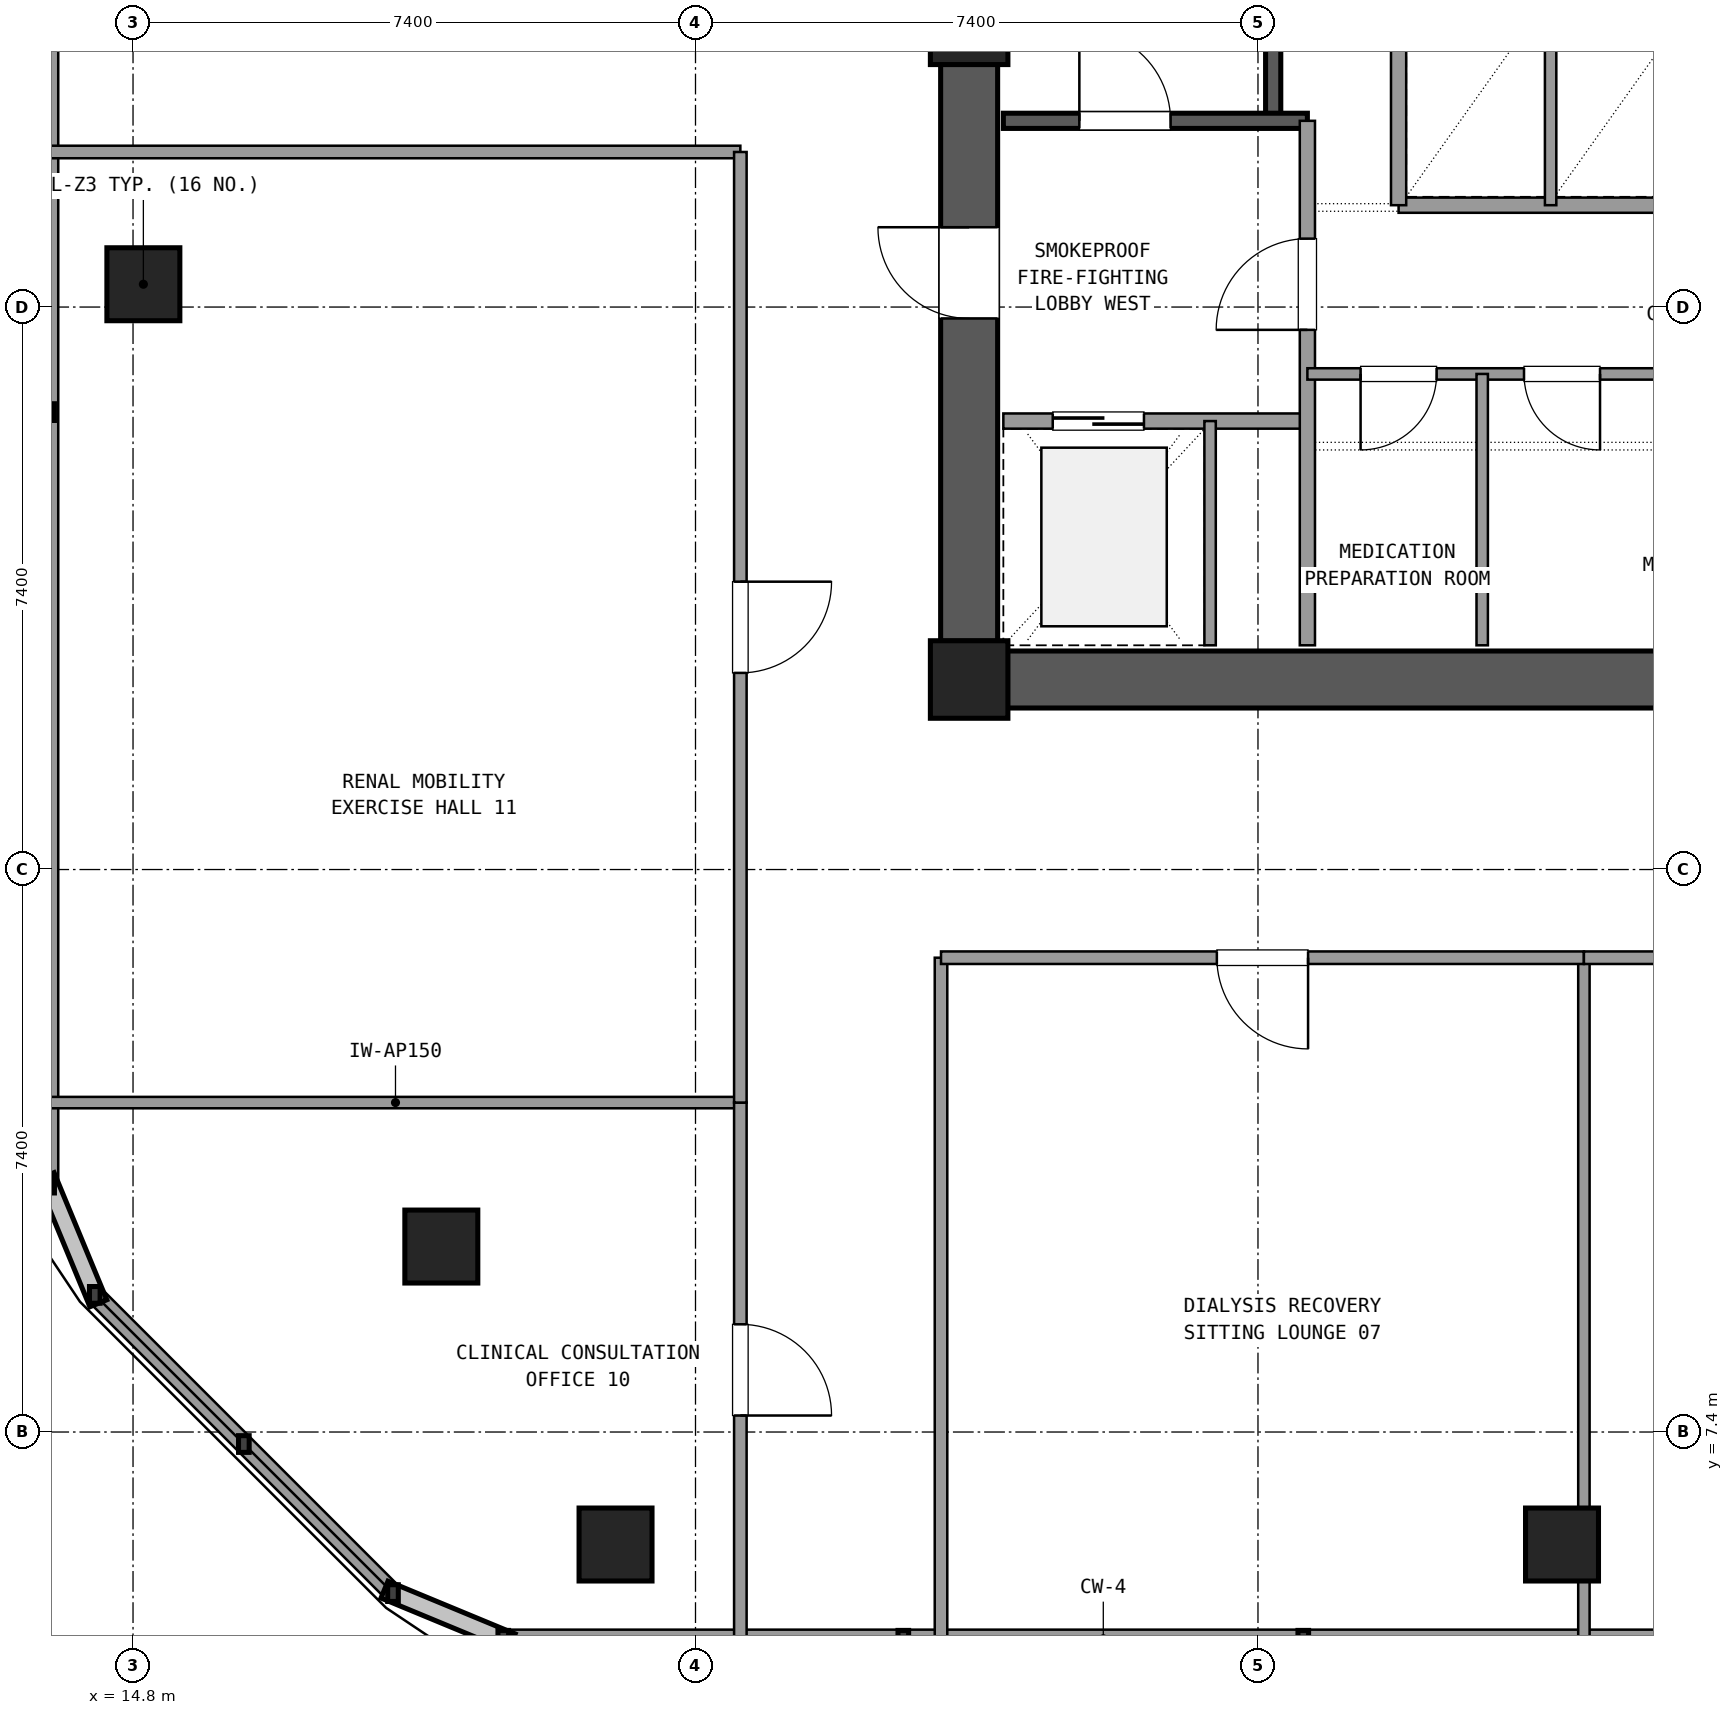
"""IFC4 building model, lengths in metres.
Left out: names, types, materials, properties, quantities, classifications, styles, units other than length and angle.
Written with IfcOpenShell. Run it as: python <this file> out.ifc"""

import sys

from ifc_helpers import new_model, si_unit, direction, frame, frame_2d, origin, origin_2d, place, context, subcontext, project, spatial, rectangle, extrude, element, fill, save


model = new_model("IFC4")
c1 = context("Model", 3, precision=1e-05, world=origin(), true_north=direction((0.0, 1.0)))
c2 = subcontext(c1, "Body", "Model", "MODEL_VIEW")
j1 = project(units=[si_unit("LENGTHUNIT", "METRE"), si_unit("PLANEANGLEUNIT", "RADIAN")], contexts=[c1])
p1 = place(None, origin())
s1 = spatial("IfcSite", under=j1, at=p1, CompositionType="ELEMENT")
p2 = place(p1, origin())
s2 = spatial("IfcBuilding", under=s1, at=p2, CompositionType="ELEMENT")
p3 = place(p2, frame((0.0, 0.0, 152.82)))
s3 = spatial("IfcBuildingStorey", under=s2, at=p3, CompositionType="ELEMENT", Elevation=152.82)
for number, where, z_axis, x_axis in (
    (1, (25.8, 17.3, 0.0), (0.0, 0.0, 1.0), (1.0, 0.0, 0.0)),
    (2, (25.8, 25.9, 0.0), (0.0, 0.0, 1.0), (1.0, 0.0, 0.0)),
):
    element("IfcColumn", number, at=place(p3, frame(where, z_axis=z_axis, x_axis=x_axis)), inside=s3, PredefinedType="COLUMN", context=c2, shape_type="SweptSolid", body=[
        extrude(rectangle(XDim=1.02, YDim=1.02, at=origin_2d()), origin(), (0.0, 0.0, 1.0), 3.6),
    ])
p4 = place(p3, frame((26.305, 17.3, 0.0), z_axis=(0.0, 0.0, 1.0), x_axis=(1.0, 0.0, 0.0)))
e3 = element("IfcWall", 3, at=p4, inside=s3, PredefinedType="SHEAR", context=c2, shape_type="SweptSolid", body=[
    extrude(rectangle(XDim=10.19, YDim=0.75, at=frame_2d((5.095, 0.0))), origin(), (0.0, 0.0, 1.0), 3.32),
])
p5 = place(p3, frame((25.8, 25.395, 0.0), z_axis=(0.0, 0.0, 1.0), x_axis=(0.0, -1.0, 0.0)))
e4 = element("IfcWall", 4, at=p5, inside=s3, PredefinedType="SHEAR", context=c2, shape_type="SweptSolid", body=[
    extrude(rectangle(XDim=7.59, YDim=0.75, at=frame_2d((3.795, 0.0))), origin(), (0.0, 0.0, 1.0), 3.32),
])
p6 = place(p5, frame((2.145, 0.0, 0.0)))
e5 = element("IfcOpeningElement", 5, at=p6, cuts=e4, PredefinedType="OPENING", context=c2, shape_type="SweptSolid", body=[
    extrude(rectangle(XDim=1.2, YDim=2.15, at=frame_2d((0.6, 1.075))), frame((0.0, 0.385, 0.0), z_axis=(0.0, -1.0, 0.0), x_axis=(1.0, 0.0, 0.0)), (0.0, 0.0, 1.0), 0.77),
])
for number, where, z_axis, x_axis in (
    (6, (14.936, 22.5, 0.0), (0.0, 0.0, 1.0), (1.0, 0.0, 0.0)),
    (7, (18.856, 9.84, 0.0), (0.0, 0.0, 1.0), (1.0, 0.0, 0.0)),
    (8, (21.148, 5.92, 0.0), (0.0, 0.0, 1.0), (1.0, 0.0, 0.0)),
    (9, (33.6, 5.92, 0.0), (0.0, 0.0, 1.0), (1.0, 0.0, 0.0)),
):
    element("IfcColumn", number, at=place(p3, frame(where, z_axis=z_axis, x_axis=x_axis)), inside=s3, PredefinedType="COLUMN", context=c2, shape_type="SweptSolid", body=[
        extrude(rectangle(XDim=0.96, YDim=0.96, at=origin_2d()), origin(), (0.0, 0.0, 1.0), 3.6),
    ])
p7 = place(p3, frame((19.671, 4.68, 0.0), z_axis=(0.0, 0.0, 1.0), x_axis=(1.0, 0.0, 0.0)))
e10 = element("IfcWall", 10, at=p7, inside=s3, PredefinedType="SOLIDWALL", context=c2, shape_type="SweptSolid", body=[
    extrude(rectangle(XDim=15.788, YDim=0.24, at=frame_2d((7.894, 0.0))), origin(), (0.0, 0.0, 1.0), 0.85),
])
p8 = place(p3, frame((13.696, 41.145, 0.0), z_axis=(0.0, 0.0, 1.0), x_axis=(0.0, -1.0, 0.0)))
e11 = element("IfcWall", 11, at=p8, inside=s3, PredefinedType="SOLIDWALL", context=c2, shape_type="SweptSolid", body=[
    extrude(rectangle(XDim=30.49, YDim=0.24, at=frame_2d((15.245, 0.0))), origin(), (0.0, 0.0, 1.0), 0.85),
])
p9 = place(p3, frame((14.297, 9.204, 0.0), z_axis=(0.0, 0.0, 1.0), x_axis=(0.707084777957, -0.707128783731, 0.0)))
e12 = element("IfcWall", 12, at=p9, inside=s3, PredefinedType="SOLIDWALL", context=c2, shape_type="SweptSolid", body=[
    extrude(rectangle(XDim=5.548, YDim=0.24, at=frame_2d((2.774, 0.0))), origin(), (0.0, 0.0, 1.0), 0.85),
])
p10 = place(p3, frame((29.8, 24.65, 0.0), z_axis=(0.0, 0.0, 1.0), x_axis=(0.0, 1.0, 0.0)))
e13 = element("IfcWall", 13, at=p10, inside=s3, PredefinedType="SHEAR", context=c2, shape_type="SweptSolid", body=[
    extrude(rectangle(XDim=9.4, YDim=0.2, at=frame_2d((4.7, 0.0))), origin(), (0.0, 0.0, 1.0), 3.32),
])
p11 = place(p3, frame((26.25, 24.65, 0.0), z_axis=(0.0, 0.0, 1.0), x_axis=(1.0, 0.0, 0.0)))
e14 = element("IfcWall", 14, at=p11, inside=s3, PredefinedType="SHEAR", context=c2, shape_type="SweptSolid", body=[
    extrude(rectangle(XDim=4.0, YDim=0.2, at=frame_2d((2.0, 0.0))), origin(), (0.0, 0.0, 1.0), 3.32),
])
p12 = place(p11, frame((1.0, 0.0, 0.0)))
e15 = element("IfcOpeningElement", 15, at=p12, cuts=e14, PredefinedType="OPENING", context=c2, shape_type="SweptSolid", body=[
    extrude(rectangle(XDim=1.2, YDim=2.15, at=frame_2d((0.6, 1.075))), frame((0.0, 0.11, 0.0), z_axis=(0.0, -1.0, 0.0), x_axis=(1.0, 0.0, 0.0)), (0.0, 0.0, 1.0), 0.22),
])
p13 = place(p3, frame((26.25, 20.7, 0.0), z_axis=(0.0, 0.0, 1.0), x_axis=(1.0, 0.0, 0.0)))
e16 = element("IfcWall", 16, at=p13, inside=s3, PredefinedType="SOLIDWALL", context=c2, shape_type="SweptSolid", body=[
    extrude(rectangle(XDim=4.0, YDim=0.2, at=frame_2d((2.0, 0.0))), origin(), (0.0, 0.0, 1.0), 2.61),
])
p14 = place(p13, frame((0.65, 0.0, 0.0)))
e17 = element("IfcOpeningElement", 17, at=p14, cuts=e16, PredefinedType="OPENING", context=c2, shape_type="SweptSolid", body=[
    extrude(rectangle(XDim=1.2, YDim=2.15, at=frame_2d((0.6, 1.075))), frame((0.0, 0.11, 0.0), z_axis=(0.0, -1.0, 0.0), x_axis=(1.0, 0.0, 0.0)), (0.0, 0.0, 1.0), 0.22),
])
p15 = place(p3, frame((30.25, 17.75, 0.0), z_axis=(0.0, 0.0, 1.0), x_axis=(0.0, 1.0, 0.0)))
e18 = element("IfcWall", 18, at=p15, inside=s3, PredefinedType="SOLIDWALL", context=c2, shape_type="SweptSolid", body=[
    extrude(rectangle(XDim=6.9, YDim=0.2, at=frame_2d((3.45, 0.0))), origin(), (0.0, 0.0, 1.0), 2.61),
])
p16 = place(p15, frame((4.15, 0.0, 0.0)))
e19 = element("IfcOpeningElement", 19, at=p16, cuts=e18, PredefinedType="OPENING", context=c2, shape_type="SweptSolid", body=[
    extrude(rectangle(XDim=1.2, YDim=2.15, at=frame_2d((0.6, 1.075))), frame((0.0, 0.11, 0.0), z_axis=(0.0, -1.0, 0.0), x_axis=(1.0, 0.0, 0.0)), (0.0, 0.0, 1.0), 0.22),
])
p17 = place(p3, frame((28.97, 17.75, 0.0), z_axis=(0.0, 0.0, 1.0), x_axis=(0.0, 1.0, 0.0)))
e20 = element("IfcWall", 20, at=p17, inside=s3, PredefinedType="PARTITIONING", context=c2, shape_type="SweptSolid", body=[
    extrude(rectangle(XDim=2.95, YDim=0.15, at=frame_2d((1.475, 0.0))), origin(), (0.0, 0.0, 1.0), 2.61),
])
p18 = place(p3, frame((30.25, 21.32, 0.0), z_axis=(0.0, 0.0, 1.0), x_axis=(1.0, 0.0, 0.0)))
e21 = element("IfcWall", 21, at=p18, inside=s3, PredefinedType="PARTITIONING", context=c2, shape_type="SweptSolid", body=[
    extrude(rectangle(XDim=7.0, YDim=0.15, at=frame_2d((3.5, 0.0))), origin(), (0.0, 0.0, 1.0), 2.61),
])
p19 = place(p18, frame((0.7, 0.0, 0.0)))
e22 = element("IfcOpeningElement", 22, at=p19, cuts=e21, PredefinedType="OPENING", context=c2, shape_type="SweptSolid", body=[
    extrude(rectangle(XDim=1.0, YDim=2.15, at=frame_2d((0.5, 1.075))), frame((0.0, 0.085, 0.0), z_axis=(0.0, -1.0, 0.0), x_axis=(1.0, 0.0, 0.0)), (0.0, 0.0, 1.0), 0.17),
])
p20 = place(p18, frame((2.85, 0.0, 0.0)))
e23 = element("IfcOpeningElement", 23, at=p20, cuts=e21, PredefinedType="OPENING", context=c2, shape_type="SweptSolid", body=[
    extrude(rectangle(XDim=1.0, YDim=2.15, at=frame_2d((0.5, 1.075))), frame((0.0, 0.085, 0.0), z_axis=(0.0, -1.0, 0.0), x_axis=(1.0, 0.0, 0.0)), (0.0, 0.0, 1.0), 0.17),
])
p21 = place(p3, frame((32.55, 17.75, 0.0), z_axis=(0.0, 0.0, 1.0), x_axis=(0.0, 1.0, 0.0)))
e24 = element("IfcWall", 24, at=p21, inside=s3, PredefinedType="PARTITIONING", context=c2, shape_type="SweptSolid", body=[
    extrude(rectangle(XDim=3.57, YDim=0.15, at=frame_2d((1.785, 0.0))), origin(), (0.0, 0.0, 1.0), 2.61),
])
p22 = place(p3, frame((31.45, 23.54, 0.0), z_axis=(0.0, 0.0, 1.0), x_axis=(1.0, 0.0, 0.0)))
e25 = element("IfcWall", 25, at=p22, inside=s3, PredefinedType="SOLIDWALL", context=c2, shape_type="SweptSolid", body=[
    extrude(rectangle(XDim=5.9, YDim=0.2, at=frame_2d((2.95, 0.0))), origin(), (0.0, 0.0, 1.0), 2.61),
])
p23 = place(p3, frame((31.45, 23.54, 0.0), z_axis=(0.0, 0.0, 1.0), x_axis=(0.0, 1.0, 0.0)))
e26 = element("IfcWall", 26, at=p23, inside=s3, PredefinedType="SOLIDWALL", context=c2, shape_type="SweptSolid", body=[
    extrude(rectangle(XDim=2.81, YDim=0.2, at=frame_2d((1.405, 0.0))), origin(), (0.0, 0.0, 1.0), 2.61),
])
p24 = place(p3, frame((33.45, 23.54, 0.0), z_axis=(0.0, 0.0, 1.0), x_axis=(0.0, 1.0, 0.0)))
e27 = element("IfcWall", 27, at=p24, inside=s3, PredefinedType="PARTITIONING", context=c2, shape_type="SweptSolid", body=[
    extrude(rectangle(XDim=2.81, YDim=0.15, at=frame_2d((1.405, 0.0))), origin(), (0.0, 0.0, 1.0), 2.61),
])
p25 = place(p3, frame((25.43, 4.7, 0.0), z_axis=(0.0, 0.0, 1.0), x_axis=(0.0, 1.0, 0.0)))
e28 = element("IfcWall", 28, at=p25, inside=s3, PredefinedType="PARTITIONING", context=c2, shape_type="SweptSolid", body=[
    extrude(rectangle(XDim=8.94, YDim=0.165, at=frame_2d((4.47, 0.0))), origin(), (0.0, 0.0, 1.0), 2.61),
])
p26 = place(p3, frame((13.716, 24.24, 0.0), z_axis=(0.0, 0.0, 1.0), x_axis=(1.0, 0.0, 0.0)))
e29 = element("IfcWall", 29, at=p26, inside=s3, PredefinedType="PARTITIONING", context=c2, shape_type="SweptSolid", body=[
    extrude(rectangle(XDim=9.074, YDim=0.165, at=frame_2d((4.537, 0.0))), origin(), (0.0, 0.0, 1.0), 2.61),
])
p27 = place(p3, frame((33.888, 13.64, 0.0), z_axis=(0.0, 0.0, 1.0), x_axis=(0.0, -1.0, 0.0)))
e30 = element("IfcWall", 30, at=p27, inside=s3, PredefinedType="PARTITIONING", context=c2, shape_type="SweptSolid", body=[
    extrude(rectangle(XDim=8.94, YDim=0.15, at=frame_2d((4.47, 0.0))), origin(), (0.0, 0.0, 1.0), 2.61),
])
p28 = place(p3, frame((25.43, 13.64, 0.0), z_axis=(0.0, 0.0, 1.0), x_axis=(1.0, 0.0, 0.0)))
e31 = element("IfcWall", 31, at=p28, inside=s3, PredefinedType="PARTITIONING", context=c2, shape_type="SweptSolid", body=[
    extrude(rectangle(XDim=8.458, YDim=0.165, at=frame_2d((4.229, 0.0))), origin(), (0.0, 0.0, 1.0), 2.61),
])
p29 = place(p28, frame((3.629, 0.0, 0.0)))
e32 = element("IfcOpeningElement", 32, at=p29, cuts=e31, PredefinedType="OPENING", context=c2, shape_type="SweptSolid", body=[
    extrude(rectangle(XDim=1.2, YDim=2.15, at=frame_2d((0.6, 1.075))), frame((0.0, 0.093, 0.0), z_axis=(0.0, -1.0, 0.0), x_axis=(1.0, 0.0, 0.0)), (0.0, 0.0, 1.0), 0.185),
])
p30 = place(p3, frame((33.888, 13.64, 0.0), z_axis=(0.0, 0.0, 1.0), x_axis=(1.0, 0.0, 0.0)))
e33 = element("IfcWall", 33, at=p30, inside=s3, PredefinedType="PARTITIONING", context=c2, shape_type="SweptSolid", body=[
    extrude(rectangle(XDim=6.118, YDim=0.165, at=frame_2d((3.059, 0.0))), origin(), (0.0, 0.0, 1.0), 2.61),
])
p31 = place(p30, frame((1.664, 0.0, 0.0)))
e34 = element("IfcOpeningElement", 34, at=p31, cuts=e33, PredefinedType="OPENING", context=c2, shape_type="SweptSolid", body=[
    extrude(rectangle(XDim=1.2, YDim=2.15, at=frame_2d((0.6, 1.075))), frame((0.0, 0.093, 0.0), z_axis=(0.0, -1.0, 0.0), x_axis=(1.0, 0.0, 0.0)), (0.0, 0.0, 1.0), 0.185),
])
p32 = place(p3, frame((22.79, 11.734, 0.0), z_axis=(0.0, 0.0, 1.0), x_axis=(-1.0, 0.0, 0.0)))
e35 = element("IfcWall", 35, at=p32, inside=s3, PredefinedType="PARTITIONING", context=c2, shape_type="SweptSolid", body=[
    extrude(rectangle(XDim=9.074, YDim=0.15, at=frame_2d((4.537, 0.0))), origin(), (0.0, 0.0, 1.0), 2.61),
])
p33 = place(p3, frame((22.79, 4.7, 0.0), z_axis=(0.0, 0.0, 1.0), x_axis=(0.0, 1.0, 0.0)))
e36 = element("IfcWall", 36, at=p33, inside=s3, PredefinedType="PARTITIONING", context=c2, shape_type="SweptSolid", body=[
    extrude(rectangle(XDim=7.034, YDim=0.165, at=frame_2d((3.517, 0.0))), origin(), (0.0, 0.0, 1.0), 2.61),
])
p34 = place(p33, frame((2.917, 0.0, 0.0)))
e37 = element("IfcOpeningElement", 37, at=p34, cuts=e36, PredefinedType="OPENING", context=c2, shape_type="SweptSolid", body=[
    extrude(rectangle(XDim=1.2, YDim=2.15, at=frame_2d((0.6, 1.075))), frame((0.0, 0.093, 0.0), z_axis=(0.0, -1.0, 0.0), x_axis=(1.0, 0.0, 0.0)), (0.0, 0.0, 1.0), 0.185),
])
p35 = place(p3, frame((22.79, 11.734, 0.0), z_axis=(0.0, 0.0, 1.0), x_axis=(0.0, 1.0, 0.0)))
e38 = element("IfcWall", 38, at=p35, inside=s3, PredefinedType="PARTITIONING", context=c2, shape_type="SweptSolid", body=[
    extrude(rectangle(XDim=12.506, YDim=0.165, at=frame_2d((6.253, 0.0))), origin(), (0.0, 0.0, 1.0), 2.61),
])
p36 = place(p35, frame((5.653, 0.0, 0.0)))
e39 = element("IfcOpeningElement", 39, at=p36, cuts=e38, PredefinedType="OPENING", context=c2, shape_type="SweptSolid", body=[
    extrude(rectangle(XDim=1.2, YDim=2.15, at=frame_2d((0.6, 1.075))), frame((0.0, 0.093, 0.0), z_axis=(0.0, -1.0, 0.0), x_axis=(1.0, 0.0, 0.0)), (0.0, 0.0, 1.0), 0.185),
])
p37 = place(p12, origin())
e40 = element("IfcDoor", 40, at=p37, inside=s3, OperationType="SINGLE_SWING_LEFT", PredefinedType="DOOR", context=c2, shape_type="SweptSolid", body=[
    extrude(rectangle(XDim=1.2, YDim=2.15, at=frame_2d((0.6, 1.075))), frame((0.0, 0.025, 0.0), z_axis=(0.0, -1.0, 0.0), x_axis=(1.0, 0.0, 0.0)), (0.0, 0.0, 1.0), 0.05),
])
fill(e15, e40)
p38 = place(p14, origin())
e41 = element("IfcDoor", 41, at=p38, inside=s3, OperationType="SLIDING_TO_LEFT", PredefinedType="DOOR", context=c2, shape_type="SweptSolid", body=[
    extrude(rectangle(XDim=1.2, YDim=2.15, at=frame_2d((0.6, 1.075))), frame((0.0, 0.025, 0.0), z_axis=(0.0, -1.0, 0.0), x_axis=(1.0, 0.0, 0.0)), (0.0, 0.0, 1.0), 0.05),
])
fill(e17, e41)
p39 = place(p16, origin())
e42 = element("IfcDoor", 42, at=p39, inside=s3, OperationType="SINGLE_SWING_LEFT", PredefinedType="DOOR", context=c2, shape_type="SweptSolid", body=[
    extrude(rectangle(XDim=1.2, YDim=2.15, at=frame_2d((0.6, 1.075))), frame((0.0, 0.025, 0.0), z_axis=(0.0, -1.0, 0.0), x_axis=(1.0, 0.0, 0.0)), (0.0, 0.0, 1.0), 0.05),
])
fill(e19, e42)
p40 = place(p6, frame((1.2, 0.0, 0.0), z_axis=(0.0, 0.0, 1.0), x_axis=(-1.0, 0.0, 0.0)))
e43 = element("IfcDoor", 43, at=p40, inside=s3, OperationType="SINGLE_SWING_LEFT", PredefinedType="DOOR", context=c2, shape_type="SweptSolid", body=[
    extrude(rectangle(XDim=1.2, YDim=2.15, at=frame_2d((0.6, 1.075))), frame((0.0, 0.025, 0.0), z_axis=(0.0, -1.0, 0.0), x_axis=(1.0, 0.0, 0.0)), (0.0, 0.0, 1.0), 0.05),
])
fill(e5, e43)
p41 = place(p19, frame((1.0, 0.0, 0.0), z_axis=(0.0, 0.0, 1.0), x_axis=(-1.0, 0.0, 0.0)))
e44 = element("IfcDoor", 44, at=p41, inside=s3, OperationType="SINGLE_SWING_LEFT", PredefinedType="DOOR", context=c2, shape_type="SweptSolid", body=[
    extrude(rectangle(XDim=1.0, YDim=2.15, at=frame_2d((0.5, 1.075))), frame((0.0, 0.025, 0.0), z_axis=(0.0, -1.0, 0.0), x_axis=(1.0, 0.0, 0.0)), (0.0, 0.0, 1.0), 0.05),
])
fill(e22, e44)
p42 = place(p20, frame((1.0, 0.0, 0.0), z_axis=(0.0, 0.0, 1.0), x_axis=(-1.0, 0.0, 0.0)))
e45 = element("IfcDoor", 45, at=p42, inside=s3, OperationType="SINGLE_SWING_RIGHT", PredefinedType="DOOR", context=c2, shape_type="SweptSolid", body=[
    extrude(rectangle(XDim=1.0, YDim=2.15, at=frame_2d((0.5, 1.075))), frame((0.0, 0.025, 0.0), z_axis=(0.0, -1.0, 0.0), x_axis=(1.0, 0.0, 0.0)), (0.0, 0.0, 1.0), 0.05),
])
fill(e23, e45)
p43 = place(p29, frame((1.2, 0.0, 0.0), z_axis=(0.0, 0.0, 1.0), x_axis=(-1.0, 0.0, 0.0)))
e46 = element("IfcDoor", 46, at=p43, inside=s3, OperationType="SINGLE_SWING_RIGHT", PredefinedType="DOOR", context=c2, shape_type="SweptSolid", body=[
    extrude(rectangle(XDim=1.2, YDim=2.15, at=frame_2d((0.6, 1.075))), frame((0.0, 0.025, 0.0), z_axis=(0.0, -1.0, 0.0), x_axis=(1.0, 0.0, 0.0)), (0.0, 0.0, 1.0), 0.05),
])
fill(e32, e46)
p44 = place(p34, frame((1.2, 0.0, 0.0), z_axis=(0.0, 0.0, 1.0), x_axis=(-1.0, 0.0, 0.0)))
e47 = element("IfcDoor", 47, at=p44, inside=s3, OperationType="SINGLE_SWING_LEFT", PredefinedType="DOOR", context=c2, shape_type="SweptSolid", body=[
    extrude(rectangle(XDim=1.2, YDim=2.15, at=frame_2d((0.6, 1.075))), frame((0.0, 0.025, 0.0), z_axis=(0.0, -1.0, 0.0), x_axis=(1.0, 0.0, 0.0)), (0.0, 0.0, 1.0), 0.05),
])
fill(e37, e47)
p45 = place(p36, frame((1.2, 0.0, 0.0), z_axis=(0.0, 0.0, 1.0), x_axis=(-1.0, 0.0, 0.0)))
e48 = element("IfcDoor", 48, at=p45, inside=s3, OperationType="SINGLE_SWING_RIGHT", PredefinedType="DOOR", context=c2, shape_type="SweptSolid", body=[
    extrude(rectangle(XDim=1.2, YDim=2.15, at=frame_2d((0.6, 1.075))), frame((0.0, 0.025, 0.0), z_axis=(0.0, -1.0, 0.0), x_axis=(1.0, 0.0, 0.0)), (0.0, 0.0, 1.0), 0.05),
])
fill(e39, e48)
save(model, sys.argv[1])
